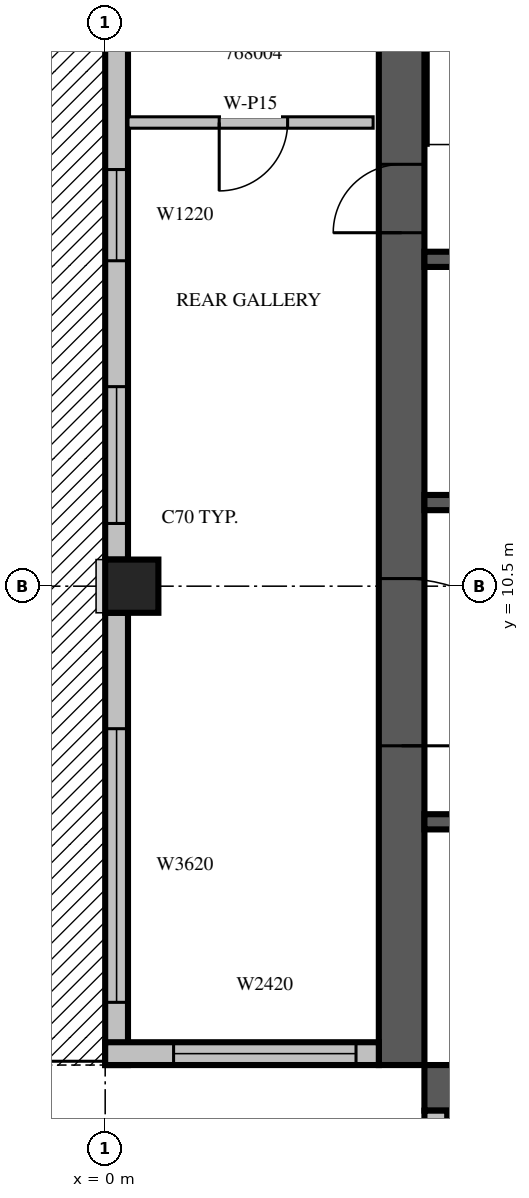
"""IFC4 building model, lengths in metres.
Left out: names, types, materials, properties, quantities, classifications, styles, units other than length and angle.
Written with IfcOpenShell. Run it as: python <this file> out.ifc"""

import sys

from ifc_helpers import new_model, si_unit, direction, frame, frame_2d, origin, origin_2d, place, context, subcontext, project, spatial, rectangle, extrude, source, transform, mapped, element, fill, save


model = new_model("IFC4")
c1 = context("Model", 3, precision=1e-05, world=origin(), true_north=direction((0.0, 1.0)))
c2 = subcontext(c1, "Body", "Model", "MODEL_VIEW")
j1 = project(units=[si_unit("LENGTHUNIT", "METRE"), si_unit("PLANEANGLEUNIT", "RADIAN")], contexts=[c1])
p1 = place(None, origin())
s1 = spatial("IfcSite", under=j1, at=p1, CompositionType="ELEMENT")
p2 = place(p1, origin())
s2 = spatial("IfcBuilding", under=s1, at=p2, CompositionType="ELEMENT")
p3 = place(p2, frame((0.0, 0.0, 298.5)))
s3 = spatial("IfcBuildingStorey", under=s2, at=p3, CompositionType="ELEMENT", Elevation=298.5)
m1 = source(origin(), c2, "Body", "SweptSolid", [
    extrude(rectangle(XDim=0.7, YDim=0.7, at=origin_2d()), origin(), (0.0, 0.0, 1.0), 3.5),
])
p4 = place(p3, frame((0.35, 10.5, 0.0), z_axis=(0.0, 0.0, 1.0), x_axis=(1.0, 0.0, 0.0)))
e1 = element("IfcColumn", 1, at=p4, inside=s3, PredefinedType="COLUMN", context=c2, shape_type="MappedRepresentation", body=[
    mapped(m1, transform((0.0, 0.0, 0.0), scale=1.0)),
])
m2 = source(origin(), c2, "Body", "SweptSolid", [
    extrude(rectangle(XDim=17.4, YDim=0.6, at=frame_2d((8.7, 0.0))), origin(), (0.0, 0.0, 1.0), 3.5),
])
p5 = place(p3, frame((3.9, 4.2, 0.0), z_axis=(0.0, 0.0, 1.0), x_axis=(0.0, 1.0, 0.0)))
e2 = element("IfcWall", 2, at=p5, inside=s3, PredefinedType="SHEAR", context=c2, shape_type="MappedRepresentation", body=[
    mapped(m2, transform((0.0, 0.0, 0.0), scale=1.0)),
])
m3 = source(origin(), c2, "Body", "SweptSolid", [
    extrude(rectangle(XDim=2.2, YDim=2.1, at=frame_2d((1.1, 1.05))), frame((0.0, 0.31, 0.0), z_axis=(0.0, -1.0, 0.0), x_axis=(1.0, 0.0, 0.0)), (0.0, 0.0, 1.0), 0.62),
])
p6 = place(p5, frame((4.2, 0.0, 0.0)))
e3 = element("IfcOpeningElement", 3, at=p6, cuts=e2, PredefinedType="OPENING", context=c2, shape_type="MappedRepresentation", body=[
    mapped(m3, transform((0.0, 0.0, 0.0), scale=1.0)),
])
m4 = source(origin(), c2, "Body", "SweptSolid", [
    extrude(rectangle(XDim=0.9, YDim=2.1, at=frame_2d((0.45, 1.05))), frame((0.0, 0.31, 0.0), z_axis=(0.0, -1.0, 0.0), x_axis=(1.0, 0.0, 0.0)), (0.0, 0.0, 1.0), 0.62),
])
p7 = place(p5, frame((10.95, 0.0, 0.0)))
e4 = element("IfcOpeningElement", 4, at=p7, cuts=e2, PredefinedType="OPENING", context=c2, shape_type="MappedRepresentation", body=[
    mapped(m4, transform((0.0, 0.0, 0.0), scale=1.0)),
])
p8 = place(p3, frame((4.2, 3.9, 0.0), z_axis=(0.0, 0.0, 1.0), x_axis=(1.0, 0.0, 0.0)))
e5 = element("IfcWall", 5, at=p8, inside=s3, PredefinedType="SHEAR", context=c2, shape_type="MappedRepresentation", body=[
    mapped(m2, transform((0.0, 0.0, 0.0), scale=1.0)),
])
p9 = place(p8, frame((15.2, 0.0, 0.0)))
e6 = element("IfcOpeningElement", 6, at=p9, cuts=e5, PredefinedType="OPENING", context=c2, shape_type="MappedRepresentation", body=[
    mapped(m4, transform((0.0, 0.0, 0.0), scale=1.0)),
])
m5 = source(origin(), c2, "Body", "SweptSolid", [
    extrude(rectangle(XDim=7.0, YDim=0.3, at=frame_2d((3.5, 0.0))), origin(), (0.0, 0.0, 1.0), 3.1),
])
p10 = place(p3, frame((0.15, 17.85, 0.0), z_axis=(0.0, 0.0, 1.0), x_axis=(0.0, -1.0, 0.0)))
e7 = element("IfcWall", 7, at=p10, inside=s3, PredefinedType="STANDARD", context=c2, shape_type="MappedRepresentation", body=[
    mapped(m5, transform((0.0, 0.0, 0.0), scale=1.0)),
])
m6 = source(origin(), c2, "Body", "SweptSolid", [
    extrude(rectangle(XDim=1.8, YDim=2.4, at=frame_2d((0.9, 1.2))), frame((0.0, 0.16, 0.0), z_axis=(0.0, -1.0, 0.0), x_axis=(1.0, 0.0, 0.0)), (0.0, 0.0, 1.0), 0.32),
])
p11 = place(p10, frame((4.725, 0.0, 0.0)))
e8 = element("IfcOpeningElement", 8, at=p11, cuts=e7, PredefinedType="OPENING", context=c2, shape_type="MappedRepresentation", body=[
    mapped(m6, transform((0.0, 0.0, 0.0), scale=1.0)),
])
m7 = source(origin(), c2, "Body", "SweptSolid", [
    extrude(rectangle(XDim=1.2, YDim=2.0, at=frame_2d((0.6, 1.0))), frame((0.0, 0.16, 0.0), z_axis=(0.0, -1.0, 0.0), x_axis=(1.0, 0.0, 0.0)), (0.0, 0.0, 1.0), 0.32),
])
p12 = place(p10, frame((1.869, 0.0, 0.6)))
e9 = element("IfcOpeningElement", 9, at=p12, cuts=e7, PredefinedType="OPENING", context=c2, shape_type="MappedRepresentation", body=[
    mapped(m7, transform((0.0, 0.0, 0.0), scale=1.0)),
])
m8 = source(origin(), c2, "Body", "SweptSolid", [
    extrude(rectangle(XDim=5.95, YDim=0.3, at=frame_2d((2.975, 0.0))), origin(), (0.0, 0.0, 1.0), 3.1),
])
p13 = place(p3, frame((0.15, 10.15, 0.0), z_axis=(0.0, 0.0, 1.0), x_axis=(0.0, -1.0, 0.0)))
e10 = element("IfcWall", 10, at=p13, inside=s3, PredefinedType="STANDARD", context=c2, shape_type="MappedRepresentation", body=[
    mapped(m8, transform((0.0, 0.0, 0.0), scale=1.0)),
])
m9 = source(origin(), c2, "Body", "SweptSolid", [
    extrude(rectangle(XDim=3.6, YDim=2.0, at=frame_2d((1.8, 1.0))), frame((0.0, 0.16, 0.0), z_axis=(0.0, -1.0, 0.0), x_axis=(1.0, 0.0, 0.0)), (0.0, 0.0, 1.0), 0.32),
])
p14 = place(p13, frame((1.525, 0.0, 0.6)))
e11 = element("IfcOpeningElement", 11, at=p14, cuts=e10, PredefinedType="OPENING", context=c2, shape_type="MappedRepresentation", body=[
    mapped(m9, transform((0.0, 0.0, 0.0), scale=1.0)),
])
m10 = source(origin(), c2, "Body", "SweptSolid", [
    extrude(rectangle(XDim=3.6, YDim=0.3, at=frame_2d((1.8, 0.0))), origin(), (0.0, 0.0, 1.0), 3.1),
])
p15 = place(p3, frame((0.0, 4.35, 0.0), z_axis=(0.0, 0.0, 1.0), x_axis=(1.0, 0.0, 0.0)))
e12 = element("IfcWall", 12, at=p15, inside=s3, PredefinedType="STANDARD", context=c2, shape_type="MappedRepresentation", body=[
    mapped(m10, transform((0.0, 0.0, 0.0), scale=1.0)),
])
m11 = source(origin(), c2, "Body", "SweptSolid", [
    extrude(rectangle(XDim=2.4, YDim=2.0, at=frame_2d((1.2, 1.0))), frame((0.0, 0.16, 0.0), z_axis=(0.0, -1.0, 0.0), x_axis=(1.0, 0.0, 0.0)), (0.0, 0.0, 1.0), 0.32),
])
p16 = place(p15, frame((0.9, 0.0, 0.6)))
e13 = element("IfcOpeningElement", 13, at=p16, cuts=e12, PredefinedType="OPENING", context=c2, shape_type="MappedRepresentation", body=[
    mapped(m11, transform((0.0, 0.0, 0.0), scale=1.0)),
])
p17 = place(p3, frame((4.35, 3.6, 0.0), z_axis=(0.0, 0.0, 1.0), x_axis=(0.0, -1.0, 0.0)))
e14 = element("IfcWall", 14, at=p17, inside=s3, PredefinedType="STANDARD", context=c2, shape_type="MappedRepresentation", body=[
    mapped(m10, transform((0.0, 0.0, 0.0), scale=1.0)),
])
p18 = place(p17, frame((0.3, 0.0, 0.6)))
e15 = element("IfcOpeningElement", 15, at=p18, cuts=e14, PredefinedType="OPENING", context=c2, shape_type="MappedRepresentation", body=[
    mapped(m11, transform((0.0, 0.0, 0.0), scale=1.0)),
])
m12 = source(origin(), c2, "Body", "SweptSolid", [
    extrude(rectangle(XDim=9.6, YDim=0.2, at=frame_2d((4.8, 0.0))), origin(), (0.0, 0.0, 1.0), 3.5),
])
p19 = place(p3, frame((4.2, 7.4, 0.0), z_axis=(0.0, 0.0, 1.0), x_axis=(1.0, 0.0, 0.0)))
e16 = element("IfcWall", 16, at=p19, inside=s3, PredefinedType="SOLIDWALL", context=c2, shape_type="MappedRepresentation", body=[
    mapped(m12, transform((0.0, 0.0, 0.0), scale=1.0)),
])
m13 = source(origin(), c2, "Body", "SweptSolid", [
    extrude(rectangle(XDim=1.1, YDim=2.1, at=frame_2d((0.55, 1.05))), frame((0.0, 0.11, 0.0), z_axis=(0.0, -1.0, 0.0), x_axis=(1.0, 0.0, 0.0)), (0.0, 0.0, 1.0), 0.22),
])
p20 = place(p19, frame((0.65, 0.0, 0.0)))
e17 = element("IfcOpeningElement", 17, at=p20, cuts=e16, PredefinedType="OPENING", context=c2, shape_type="MappedRepresentation", body=[
    mapped(m13, transform((0.0, 0.0, 0.0), scale=1.0)),
])
p21 = place(p19, frame((3.05, 0.0, 0.0)))
e18 = element("IfcOpeningElement", 18, at=p21, cuts=e16, PredefinedType="OPENING", context=c2, shape_type="MappedRepresentation", body=[
    mapped(m13, transform((0.0, 0.0, 0.0), scale=1.0)),
])
p22 = place(p19, frame((5.45, 0.0, 0.0)))
e19 = element("IfcOpeningElement", 19, at=p22, cuts=e16, PredefinedType="OPENING", context=c2, shape_type="MappedRepresentation", body=[
    mapped(m13, transform((0.0, 0.0, 0.0), scale=1.0)),
])
p23 = place(p19, frame((7.85, 0.0, 0.0)))
e20 = element("IfcOpeningElement", 20, at=p23, cuts=e16, PredefinedType="OPENING", context=c2, shape_type="MappedRepresentation", body=[
    mapped(m13, transform((0.0, 0.0, 0.0), scale=1.0)),
])
m14 = source(origin(), c2, "Body", "SweptSolid", [
    extrude(rectangle(XDim=4.8, YDim=0.2, at=frame_2d((2.4, 0.0))), origin(), (0.0, 0.0, 1.0), 3.5),
])
p24 = place(p3, frame((4.2, 11.6, 0.0), z_axis=(0.0, 0.0, 1.0), x_axis=(1.0, 0.0, 0.0)))
e21 = element("IfcWall", 21, at=p24, inside=s3, PredefinedType="SOLIDWALL", context=c2, shape_type="MappedRepresentation", body=[
    mapped(m14, transform((0.0, 0.0, 0.0), scale=1.0)),
])
p25 = place(p24, frame((0.65, 0.0, 0.0)))
e22 = element("IfcOpeningElement", 22, at=p25, cuts=e21, PredefinedType="OPENING", context=c2, shape_type="MappedRepresentation", body=[
    mapped(m13, transform((0.0, 0.0, 0.0), scale=1.0)),
])
p26 = place(p24, frame((3.05, 0.0, 0.0)))
e23 = element("IfcOpeningElement", 23, at=p26, cuts=e21, PredefinedType="OPENING", context=c2, shape_type="MappedRepresentation", body=[
    mapped(m13, transform((0.0, 0.0, 0.0), scale=1.0)),
])
p27 = place(p3, frame((4.2, 14.8, 0.0), z_axis=(0.0, 0.0, 1.0), x_axis=(1.0, 0.0, 0.0)))
e24 = element("IfcWall", 24, at=p27, inside=s3, PredefinedType="SOLIDWALL", context=c2, shape_type="MappedRepresentation", body=[
    mapped(m14, transform((0.0, 0.0, 0.0), scale=1.0)),
])
m15 = source(origin(), c2, "Body", "SweptSolid", [
    extrude(rectangle(XDim=3.225, YDim=0.15, at=frame_2d((1.613, 0.0))), origin(), (0.0, 0.0, 1.0), 3.1),
])
p28 = place(p3, frame((0.3, 16.6, 0.0), z_axis=(0.0, 0.0, 1.0), x_axis=(1.0, 0.0, 0.0)))
e25 = element("IfcWall", 25, at=p28, inside=s3, PredefinedType="PARTITIONING", context=c2, shape_type="MappedRepresentation", body=[
    mapped(m15, transform((0.0, 0.0, 0.0), scale=1.0)),
])
m16 = source(origin(), c2, "Body", "SweptSolid", [
    extrude(rectangle(XDim=0.9, YDim=2.1, at=frame_2d((0.45, 1.05))), frame((0.0, 0.085, 0.0), z_axis=(0.0, -1.0, 0.0), x_axis=(1.0, 0.0, 0.0)), (0.0, 0.0, 1.0), 0.17),
])
p29 = place(p28, frame((1.2, 0.0, 0.0)))
e26 = element("IfcOpeningElement", 26, at=p29, cuts=e25, PredefinedType="OPENING", context=c2, shape_type="MappedRepresentation", body=[
    mapped(m16, transform((0.0, 0.0, 0.0), scale=1.0)),
])
m17 = source(origin(), c2, "Body", "SweptSolid", [
    extrude(rectangle(XDim=1.8, YDim=2.4, at=frame_2d((0.9, 1.2))), frame((0.0, 0.025, 0.0), z_axis=(0.0, -1.0, 0.0), x_axis=(1.0, 0.0, 0.0)), (0.0, 0.0, 1.0), 0.05),
])
p30 = place(p11, origin())
e27 = element("IfcDoor", 27, at=p30, inside=s3, OperationType="SLIDING_TO_LEFT", PredefinedType="DOOR", context=c2, shape_type="MappedRepresentation", body=[
    mapped(m17, transform((0.0, 0.0, 0.0), scale=1.0)),
])
fill(e8, e27)
m18 = source(origin(), c2, "Body", "SweptSolid", [
    extrude(rectangle(XDim=3.6, YDim=2.0, at=frame_2d((1.8, 1.0))), frame((0.0, 0.03, 0.0), z_axis=(0.0, -1.0, 0.0), x_axis=(1.0, 0.0, 0.0)), (0.0, 0.0, 1.0), 0.06),
])
p31 = place(p14, origin())
e28 = element("IfcWindow", 28, at=p31, inside=s3, PartitioningType="SINGLE_PANEL", PredefinedType="WINDOW", context=c2, shape_type="MappedRepresentation", body=[
    mapped(m18, transform((0.0, 0.0, 0.0), scale=1.0)),
])
fill(e11, e28)
m19 = source(origin(), c2, "Body", "SweptSolid", [
    extrude(rectangle(XDim=1.2, YDim=2.0, at=frame_2d((0.6, 1.0))), frame((0.0, 0.03, 0.0), z_axis=(0.0, -1.0, 0.0), x_axis=(1.0, 0.0, 0.0)), (0.0, 0.0, 1.0), 0.06),
])
p32 = place(p12, origin())
e29 = element("IfcWindow", 29, at=p32, inside=s3, PartitioningType="SINGLE_PANEL", PredefinedType="WINDOW", context=c2, shape_type="MappedRepresentation", body=[
    mapped(m19, transform((0.0, 0.0, 0.0), scale=1.0)),
])
fill(e9, e29)
m20 = source(origin(), c2, "Body", "SweptSolid", [
    extrude(rectangle(XDim=2.4, YDim=2.0, at=frame_2d((1.2, 1.0))), frame((0.0, 0.03, 0.0), z_axis=(0.0, -1.0, 0.0), x_axis=(1.0, 0.0, 0.0)), (0.0, 0.0, 1.0), 0.06),
])
p33 = place(p16, origin())
e30 = element("IfcWindow", 30, at=p33, inside=s3, PartitioningType="SINGLE_PANEL", PredefinedType="WINDOW", context=c2, shape_type="MappedRepresentation", body=[
    mapped(m20, transform((0.0, 0.0, 0.0), scale=1.0)),
])
fill(e13, e30)
m21 = source(origin(), c2, "Body", "SweptSolid", [
    extrude(rectangle(XDim=2.2, YDim=2.1, at=frame_2d((1.1, 1.05))), frame((0.0, 0.025, 0.0), z_axis=(0.0, -1.0, 0.0), x_axis=(1.0, 0.0, 0.0)), (0.0, 0.0, 1.0), 0.05),
])
p34 = place(p6, origin())
e31 = element("IfcDoor", 31, at=p34, inside=s3, OperationType="DOUBLE_DOOR_SINGLE_SWING", PredefinedType="DOOR", context=c2, shape_type="MappedRepresentation", body=[
    mapped(m21, transform((0.0, 0.0, 0.0), scale=1.0)),
])
fill(e3, e31)
m22 = source(origin(), c2, "Body", "SweptSolid", [
    extrude(rectangle(XDim=0.9, YDim=2.1, at=frame_2d((0.45, 1.05))), frame((0.0, 0.025, 0.0), z_axis=(0.0, -1.0, 0.0), x_axis=(1.0, 0.0, 0.0)), (0.0, 0.0, 1.0), 0.05),
])
p35 = place(p7, origin())
e32 = element("IfcDoor", 32, at=p35, inside=s3, OperationType="SINGLE_SWING_LEFT", PredefinedType="DOOR", context=c2, shape_type="MappedRepresentation", body=[
    mapped(m22, transform((0.0, 0.0, 0.0), scale=1.0)),
])
fill(e4, e32)
p36 = place(p29, origin())
e33 = element("IfcDoor", 33, at=p36, inside=s3, OperationType="SINGLE_SWING_RIGHT", PredefinedType="DOOR", context=c2, shape_type="MappedRepresentation", body=[
    mapped(m22, transform((0.0, 0.0, 0.0), scale=1.0)),
])
fill(e26, e33)
save(model, sys.argv[1])
